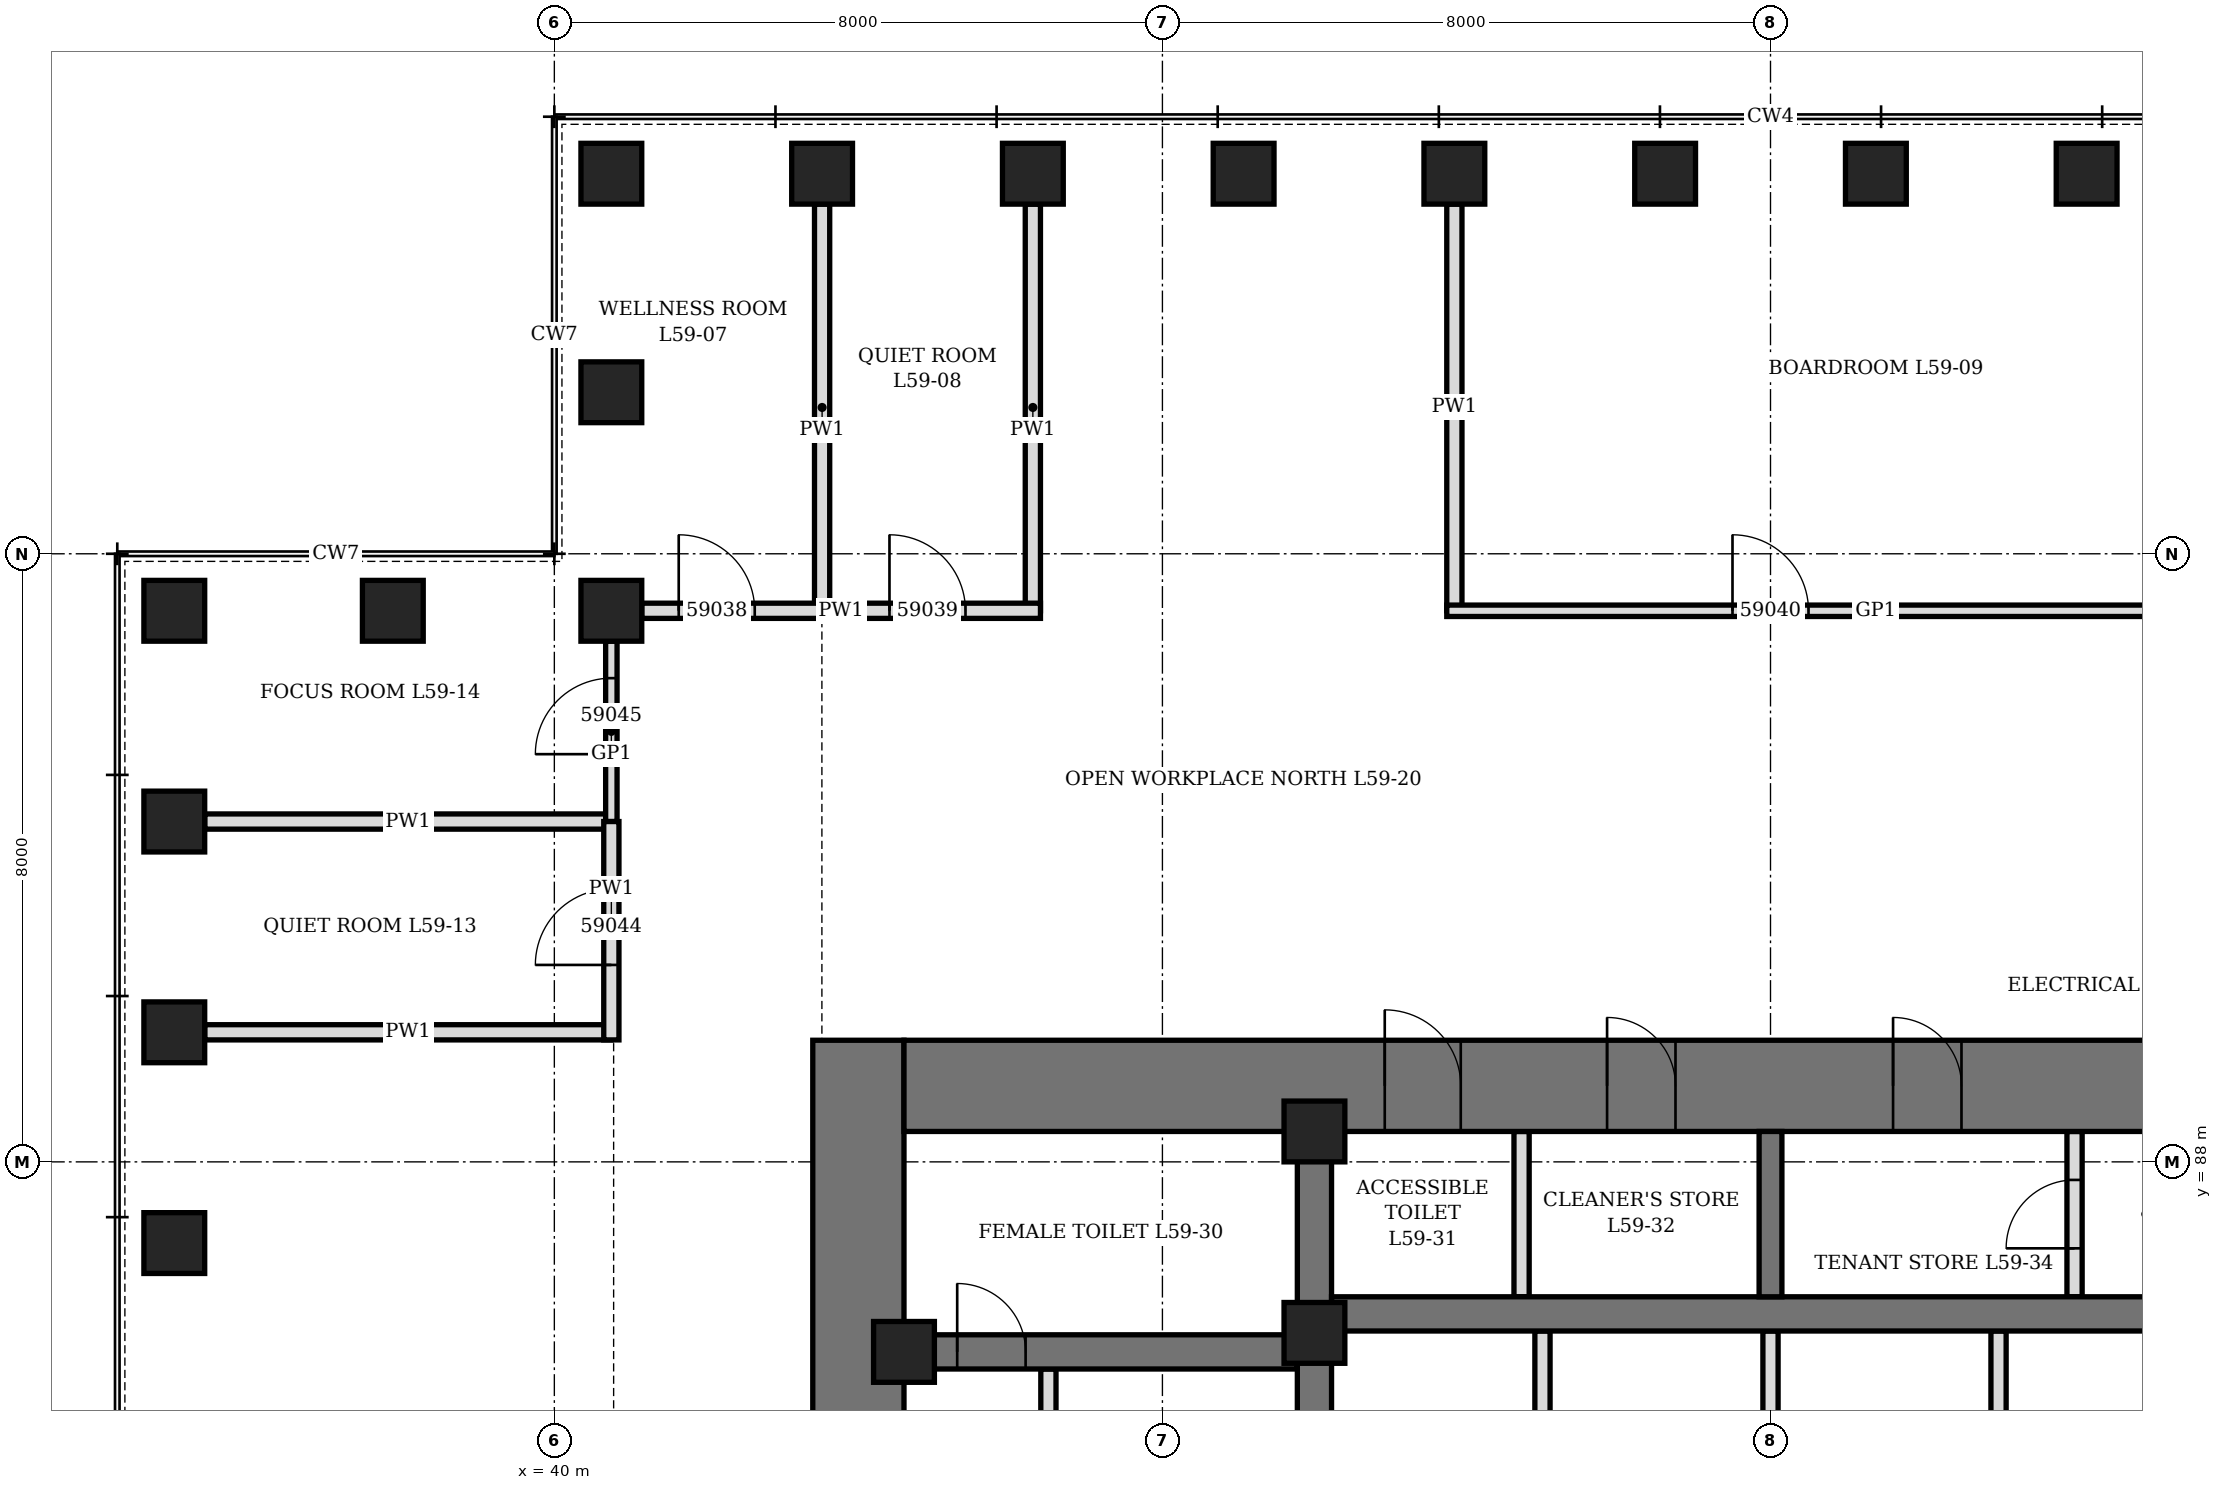
"""IFC4 building model, lengths in metres.
Left out: names, types, materials, properties, quantities, classifications, styles, units other than length and angle.
Written with IfcOpenShell. Run it as: python <this file> out.ifc"""

import sys

from ifc_helpers import new_model, si_unit, direction, frame, frame_2d, origin, origin_2d, place, context, subcontext, project, spatial, rectangle, hollow_rectangle, extrude, element, fill, save


model = new_model("IFC4")
c1 = context("Model", 3, precision=1e-05, world=origin(), true_north=direction((0.0, 1.0)))
c2 = subcontext(c1, "Body", "Model", "MODEL_VIEW")
j1 = project(units=[si_unit("LENGTHUNIT", "METRE"), si_unit("PLANEANGLEUNIT", "RADIAN")], contexts=[c1])
p1 = place(None, origin())
s1 = spatial("IfcSite", under=j1, at=p1, CompositionType="ELEMENT")
p2 = place(p1, origin())
s2 = spatial("IfcBuilding", under=s1, at=p2, CompositionType="ELEMENT")
p3 = place(p2, frame((0.0, 0.0, 262.9)))
s3 = spatial("IfcBuildingStorey", under=s2, at=p3, CompositionType="ELEMENT", Elevation=262.9)
for number, where, z_axis, x_axis in (
    (1, (60.159, 101.0, 0.0), (0.0, 0.0, 1.0), (1.0, 0.0, 0.0)),
    (2, (57.386, 101.0, 0.0), (0.0, 0.0, 1.0), (1.0, 0.0, 0.0)),
    (3, (54.614, 101.0, 0.0), (0.0, 0.0, 1.0), (1.0, 0.0, 0.0)),
    (4, (51.841, 101.0, 0.0), (0.0, 0.0, 1.0), (1.0, 0.0, 0.0)),
    (5, (49.068, 101.0, 0.0), (0.0, 0.0, 1.0), (1.0, 0.0, 0.0)),
    (6, (46.295, 101.0, 0.0), (0.0, 0.0, 1.0), (1.0, 0.0, 0.0)),
    (7, (43.523, 101.0, 0.0), (0.0, 0.0, 1.0), (1.0, 0.0, 0.0)),
    (8, (40.75, 101.0, 0.0), (0.0, 0.0, 1.0), (0.0, 1.0, 0.0)),
    (9, (40.75, 98.125, 0.0), (0.0, 0.0, 1.0), (0.0, 1.0, 0.0)),
    (10, (40.75, 95.25, 0.0), (0.0, 0.0, 1.0), (1.0, 0.0, 0.0)),
    (11, (37.875, 95.25, 0.0), (0.0, 0.0, 1.0), (1.0, 0.0, 0.0)),
    (12, (35.0, 95.25, 0.0), (0.0, 0.0, 1.0), (0.0, 1.0, 0.0)),
    (13, (35.0, 92.477, 0.0), (0.0, 0.0, 1.0), (0.0, 1.0, 0.0)),
    (14, (35.0, 89.705, 0.0), (0.0, 0.0, 1.0), (0.0, 1.0, 0.0)),
    (15, (35.0, 86.932, 0.0), (0.0, 0.0, 1.0), (0.0, 1.0, 0.0)),
):
    element("IfcColumn", number, at=place(p3, frame(where, z_axis=z_axis, x_axis=x_axis)), inside=s3, PredefinedType="COLUMN", context=c2, shape_type="SweptSolid", body=[
        extrude(hollow_rectangle(XDim=0.8, YDim=0.8, WallThickness=0.1, at=origin_2d()), origin(), (0.0, 0.0, 1.0), 4.2),
    ])
p4 = place(p3, frame((44.0, 70.4, 0.0), z_axis=(0.0, 0.0, 1.0), x_axis=(0.0, 1.0, 0.0)))
e16 = element("IfcWall", 16, at=p4, inside=s3, PredefinedType="SHEAR", context=c2, shape_type="SweptSolid", body=[
    extrude(rectangle(XDim=19.2, YDim=1.2, at=frame_2d((9.6, 0.0))), origin(), (0.0, 0.0, 1.0), 4.2),
])
p5 = place(p4, frame((8.6, 0.0, 0.0)))
e17 = element("IfcOpeningElement", 17, at=p5, cuts=e16, PredefinedType="OPENING", context=c2, shape_type="SweptSolid", body=[
    extrude(rectangle(XDim=2.0, YDim=2.4, at=frame_2d((1.0, 1.2))), frame((0.0, 0.61, 0.0), z_axis=(0.0, -1.0, 0.0), x_axis=(1.0, 0.0, 0.0)), (0.0, 0.0, 1.0), 1.22),
])
p6 = place(p3, frame((44.6, 89.0, 0.0), z_axis=(0.0, 0.0, 1.0), x_axis=(1.0, 0.0, 0.0)))
e18 = element("IfcWall", 18, at=p6, inside=s3, PredefinedType="SHEAR", context=c2, shape_type="SweptSolid", body=[
    extrude(rectangle(XDim=22.8, YDim=1.2, at=frame_2d((11.4, 0.0))), origin(), (0.0, 0.0, 1.0), 4.2),
])
p7 = place(p6, frame((6.325, 0.0, 0.0)))
e19 = element("IfcOpeningElement", 19, at=p7, cuts=e18, PredefinedType="OPENING", context=c2, shape_type="SweptSolid", body=[
    extrude(rectangle(XDim=1.0, YDim=2.1, at=frame_2d((0.5, 1.05))), frame((0.0, 0.61, 0.0), z_axis=(0.0, -1.0, 0.0), x_axis=(1.0, 0.0, 0.0)), (0.0, 0.0, 1.0), 1.22),
])
p8 = place(p6, frame((9.25, 0.0, 0.0)))
e20 = element("IfcOpeningElement", 20, at=p8, cuts=e18, PredefinedType="OPENING", context=c2, shape_type="SweptSolid", body=[
    extrude(rectangle(XDim=0.9, YDim=2.1, at=frame_2d((0.45, 1.05))), frame((0.0, 0.61, 0.0), z_axis=(0.0, -1.0, 0.0), x_axis=(1.0, 0.0, 0.0)), (0.0, 0.0, 1.0), 1.22),
])
p9 = place(p6, frame((13.012, 0.0, 0.0)))
e21 = element("IfcOpeningElement", 21, at=p9, cuts=e18, PredefinedType="OPENING", context=c2, shape_type="SweptSolid", body=[
    extrude(rectangle(XDim=0.9, YDim=2.1, at=frame_2d((0.45, 1.05))), frame((0.0, 0.61, 0.0), z_axis=(0.0, -1.0, 0.0), x_axis=(1.0, 0.0, 0.0)), (0.0, 0.0, 1.0), 1.22),
])
p10 = place(p3, frame((50.0, 71.6, 0.0), z_axis=(0.0, 0.0, 1.0), x_axis=(0.0, 1.0, 0.0)))
e22 = element("IfcWall", 22, at=p10, inside=s3, PredefinedType="SHEAR", context=c2, shape_type="SweptSolid", body=[
    extrude(rectangle(XDim=16.8, YDim=0.45, at=frame_2d((8.4, 0.0))), origin(), (0.0, 0.0, 1.0), 4.2),
])
p11 = place(p10, frame((7.5, 0.0, 0.0)))
e23 = element("IfcOpeningElement", 23, at=p11, cuts=e22, PredefinedType="OPENING", context=c2, shape_type="SweptSolid", body=[
    extrude(rectangle(XDim=1.8, YDim=2.4, at=frame_2d((0.9, 1.2))), frame((0.0, 0.235, 0.0), z_axis=(0.0, -1.0, 0.0), x_axis=(1.0, 0.0, 0.0)), (0.0, 0.0, 1.0), 0.47),
])
p12 = place(p3, frame((44.6, 85.5, 0.0), z_axis=(0.0, 0.0, 1.0), x_axis=(1.0, 0.0, 0.0)))
e24 = element("IfcWall", 24, at=p12, inside=s3, PredefinedType="SHEAR", context=c2, shape_type="SweptSolid", body=[
    extrude(rectangle(XDim=5.175, YDim=0.45, at=frame_2d((2.587, 0.0))), origin(), (0.0, 0.0, 1.0), 4.2),
])
p13 = place(p12, frame((0.7, 0.0, 0.0)))
e25 = element("IfcOpeningElement", 25, at=p13, cuts=e24, PredefinedType="OPENING", context=c2, shape_type="SweptSolid", body=[
    extrude(rectangle(XDim=0.9, YDim=2.1, at=frame_2d((0.45, 1.05))), frame((0.0, 0.235, 0.0), z_axis=(0.0, -1.0, 0.0), x_axis=(1.0, 0.0, 0.0)), (0.0, 0.0, 1.0), 0.47),
])
p14 = place(p3, frame((50.225, 86.0, 0.0), z_axis=(0.0, 0.0, 1.0), x_axis=(1.0, 0.0, 0.0)))
e26 = element("IfcWall", 26, at=p14, inside=s3, PredefinedType="SHEAR", context=c2, shape_type="SweptSolid", body=[
    extrude(rectangle(XDim=11.55, YDim=0.45, at=frame_2d((5.775, 0.0))), origin(), (0.0, 0.0, 1.0), 4.2),
])
p15 = place(p3, frame((56.0, 86.225, 0.0), z_axis=(0.0, 0.0, 1.0), x_axis=(0.0, 1.0, 0.0)))
e27 = element("IfcWall", 27, at=p15, inside=s3, PredefinedType="SHEAR", context=c2, shape_type="SweptSolid", body=[
    extrude(rectangle(XDim=2.175, YDim=0.3, at=frame_2d((1.087, 0.0))), origin(), (0.0, 0.0, 1.0), 4.2),
])
for number, where, z_axis, x_axis in (
    (28, (44.6, 85.5, 0.0), (0.0, 0.0, 1.0), (1.0, 0.0, 0.0)),
    (29, (50.0, 85.75, 0.0), (0.0, 0.0, 1.0), (1.0, 0.0, 0.0)),
    (30, (50.0, 88.4, 0.0), (0.0, 0.0, 1.0), (1.0, 0.0, 0.0)),
):
    element("IfcColumn", number, at=place(p3, frame(where, z_axis=z_axis, x_axis=x_axis)), inside=s3, PredefinedType="COLUMN", context=c2, shape_type="SweptSolid", body=[
        extrude(hollow_rectangle(XDim=0.8, YDim=0.8, WallThickness=0.1, at=origin_2d()), origin(), (0.0, 0.0, 1.0), 4.2),
    ])
p16 = place(p3, frame((46.5, 82.225, 0.0), z_axis=(0.0, 0.0, 1.0), x_axis=(0.0, 1.0, 0.0)))
e31 = element("IfcWall", 31, at=p16, inside=s3, PredefinedType="PARTITIONING", context=c2, shape_type="SweptSolid", body=[
    extrude(rectangle(XDim=3.05, YDim=0.2, at=frame_2d((1.525, 0.0))), origin(), (0.0, 0.0, 1.0), 4.04),
])
p17 = place(p16, frame((1.075, 0.0, 0.0)))
e32 = element("IfcOpeningElement", 32, at=p17, cuts=e31, PredefinedType="OPENING", context=c2, shape_type="SweptSolid", body=[
    extrude(rectangle(XDim=0.9, YDim=2.1, at=frame_2d((0.45, 1.05))), frame((0.0, 0.11, 0.0), z_axis=(0.0, -1.0, 0.0), x_axis=(1.0, 0.0, 0.0)), (0.0, 0.0, 1.0), 0.22),
])
p18 = place(p3, frame((52.725, 86.225, 0.0), z_axis=(0.0, 0.0, 1.0), x_axis=(0.0, 1.0, 0.0)))
e33 = element("IfcWall", 33, at=p18, inside=s3, PredefinedType="PARTITIONING", context=c2, shape_type="SweptSolid", body=[
    extrude(rectangle(XDim=2.175, YDim=0.2, at=frame_2d((1.087, 0.0))), origin(), (0.0, 0.0, 1.0), 4.04),
])
p19 = place(p3, frame((60.0, 86.225, 0.0), z_axis=(0.0, 0.0, 1.0), x_axis=(0.0, 1.0, 0.0)))
e34 = element("IfcWall", 34, at=p19, inside=s3, PredefinedType="PARTITIONING", context=c2, shape_type="SweptSolid", body=[
    extrude(rectangle(XDim=2.175, YDim=0.2, at=frame_2d((1.087, 0.0))), origin(), (0.0, 0.0, 1.0), 4.04),
])
p20 = place(p19, frame((0.637, 0.0, 0.0)))
e35 = element("IfcOpeningElement", 35, at=p20, cuts=e34, PredefinedType="OPENING", context=c2, shape_type="SweptSolid", body=[
    extrude(rectangle(XDim=0.9, YDim=2.1, at=frame_2d((0.45, 1.05))), frame((0.0, 0.11, 0.0), z_axis=(0.0, -1.0, 0.0), x_axis=(1.0, 0.0, 0.0)), (0.0, 0.0, 1.0), 0.22),
])
p21 = place(p3, frame((53.0, 82.225, 0.0), z_axis=(0.0, 0.0, 1.0), x_axis=(0.0, 1.0, 0.0)))
e36 = element("IfcWall", 36, at=p21, inside=s3, PredefinedType="PARTITIONING", context=c2, shape_type="SweptSolid", body=[
    extrude(rectangle(XDim=3.55, YDim=0.2, at=frame_2d((1.775, 0.0))), origin(), (0.0, 0.0, 1.0), 4.04),
])
p22 = place(p3, frame((56.0, 82.225, 0.0), z_axis=(0.0, 0.0, 1.0), x_axis=(0.0, 1.0, 0.0)))
e37 = element("IfcWall", 37, at=p22, inside=s3, PredefinedType="PARTITIONING", context=c2, shape_type="SweptSolid", body=[
    extrude(rectangle(XDim=3.55, YDim=0.2, at=frame_2d((1.775, 0.0))), origin(), (0.0, 0.0, 1.0), 3.14),
])
p23 = place(p3, frame((59.0, 82.225, 0.0), z_axis=(0.0, 0.0, 1.0), x_axis=(0.0, 1.0, 0.0)))
e38 = element("IfcWall", 38, at=p23, inside=s3, PredefinedType="PARTITIONING", context=c2, shape_type="SweptSolid", body=[
    extrude(rectangle(XDim=3.55, YDim=0.2, at=frame_2d((1.775, 0.0))), origin(), (0.0, 0.0, 1.0), 4.04),
])
for number, where, z_axis, x_axis in (
    (39, (43.523, 95.25, 0.0), (0.0, 0.0, 1.0), (0.0, 1.0, 0.0)),
    (40, (46.295, 95.25, 0.0), (0.0, 0.0, 1.0), (0.0, 1.0, 0.0)),
    (41, (51.841, 95.25, 0.0), (0.0, 0.0, 1.0), (0.0, 1.0, 0.0)),
    (42, (35.4, 89.705, 0.0), (0.0, 0.0, 1.0), (1.0, 0.0, 0.0)),
    (43, (35.4, 92.477, 0.0), (0.0, 0.0, 1.0), (1.0, 0.0, 0.0)),
):
    element("IfcWall", number, at=place(p3, frame(where, z_axis=z_axis, x_axis=x_axis)), inside=s3, PredefinedType="PARTITIONING", context=c2, shape_type="SweptSolid", body=[
        extrude(rectangle(XDim=5.35, YDim=0.2, at=frame_2d((2.675, 0.0))), origin(), (0.0, 0.0, 1.0), 3.428),
    ])
p24 = place(p3, frame((51.741, 95.25, 0.0), z_axis=(0.0, 0.0, 1.0), x_axis=(1.0, 0.0, 0.0)))
e44 = element("IfcWall", 44, at=p24, inside=s3, PredefinedType="PARTITIONING", context=c2, shape_type="SweptSolid", body=[
    extrude(rectangle(XDim=11.291, YDim=0.15, at=frame_2d((5.646, 0.0))), origin(), (0.0, 0.0, 1.0), 4.04),
])
p25 = place(p24, frame((3.759, 0.0, 0.0)))
e45 = element("IfcOpeningElement", 45, at=p25, cuts=e44, PredefinedType="OPENING", context=c2, shape_type="SweptSolid", body=[
    extrude(rectangle(XDim=1.0, YDim=2.4, at=frame_2d((0.5, 1.2))), frame((0.0, 0.085, 0.0), z_axis=(0.0, -1.0, 0.0), x_axis=(1.0, 0.0, 0.0)), (0.0, 0.0, 1.0), 0.17),
])
p26 = place(p3, frame((41.15, 95.25, 0.0), z_axis=(0.0, 0.0, 1.0), x_axis=(1.0, 0.0, 0.0)))
e46 = element("IfcWall", 46, at=p26, inside=s3, PredefinedType="PARTITIONING", context=c2, shape_type="SweptSolid", body=[
    extrude(rectangle(XDim=5.246, YDim=0.2, at=frame_2d((2.623, 0.0))), origin(), (0.0, 0.0, 1.0), 4.04),
])
p27 = place(p26, frame((0.486, 0.0, 0.0)))
e47 = element("IfcOpeningElement", 47, at=p27, cuts=e46, PredefinedType="OPENING", context=c2, shape_type="SweptSolid", body=[
    extrude(rectangle(XDim=1.0, YDim=2.1, at=frame_2d((0.5, 1.05))), frame((0.0, 0.11, 0.0), z_axis=(0.0, -1.0, 0.0), x_axis=(1.0, 0.0, 0.0)), (0.0, 0.0, 1.0), 0.22),
])
p28 = place(p26, frame((3.259, 0.0, 0.0)))
e48 = element("IfcOpeningElement", 48, at=p28, cuts=e46, PredefinedType="OPENING", context=c2, shape_type="SweptSolid", body=[
    extrude(rectangle(XDim=1.0, YDim=2.1, at=frame_2d((0.5, 1.05))), frame((0.0, 0.11, 0.0), z_axis=(0.0, -1.0, 0.0), x_axis=(1.0, 0.0, 0.0)), (0.0, 0.0, 1.0), 0.22),
])
p29 = place(p3, frame((40.75, 92.477, 0.0), z_axis=(0.0, 0.0, 1.0), x_axis=(0.0, 1.0, 0.0)))
e49 = element("IfcWall", 49, at=p29, inside=s3, PredefinedType="PARTITIONING", context=c2, shape_type="SweptSolid", body=[
    extrude(rectangle(XDim=2.373, YDim=0.15, at=frame_2d((1.187, 0.0))), origin(), (0.0, 0.0, 1.0), 4.04),
])
p30 = place(p29, frame((0.886, 0.0, 0.0)))
e50 = element("IfcOpeningElement", 50, at=p30, cuts=e49, PredefinedType="OPENING", context=c2, shape_type="SweptSolid", body=[
    extrude(rectangle(XDim=1.0, YDim=2.4, at=frame_2d((0.5, 1.2))), frame((0.0, 0.085, 0.0), z_axis=(0.0, -1.0, 0.0), x_axis=(1.0, 0.0, 0.0)), (0.0, 0.0, 1.0), 0.17),
])
p31 = place(p3, frame((40.75, 89.604, 0.0), z_axis=(0.0, 0.0, 1.0), x_axis=(0.0, 1.0, 0.0)))
e51 = element("IfcWall", 51, at=p31, inside=s3, PredefinedType="PARTITIONING", context=c2, shape_type="SweptSolid", body=[
    extrude(rectangle(XDim=2.873, YDim=0.2, at=frame_2d((1.437, 0.0))), origin(), (0.0, 0.0, 1.0), 4.04),
])
p32 = place(p31, frame((0.986, 0.0, 0.0)))
e52 = element("IfcOpeningElement", 52, at=p32, cuts=e51, PredefinedType="OPENING", context=c2, shape_type="SweptSolid", body=[
    extrude(rectangle(XDim=1.0, YDim=2.1, at=frame_2d((0.5, 1.05))), frame((0.0, 0.11, 0.0), z_axis=(0.0, -1.0, 0.0), x_axis=(1.0, 0.0, 0.0)), (0.0, 0.0, 1.0), 0.22),
])
p33 = place(p13, origin())
e53 = element("IfcDoor", 53, at=p33, inside=s3, OperationType="SINGLE_SWING_RIGHT", PredefinedType="DOOR", context=c2, shape_type="SweptSolid", body=[
    extrude(rectangle(XDim=0.9, YDim=2.1, at=frame_2d((0.45, 1.05))), frame((0.0, 0.225, 0.0), z_axis=(0.0, -1.0, 0.0), x_axis=(1.0, 0.0, 0.0)), (0.0, 0.0, 1.0), 0.449),
])
fill(e25, e53)
p34 = place(p7, origin())
e54 = element("IfcDoor", 54, at=p34, inside=s3, OperationType="SINGLE_SWING_LEFT", PredefinedType="DOOR", context=c2, shape_type="SweptSolid", body=[
    extrude(rectangle(XDim=1.0, YDim=2.1, at=frame_2d((0.5, 1.05))), frame((0.0, 0.35, 0.0), z_axis=(0.0, -1.0, 0.0), x_axis=(1.0, 0.0, 0.0)), (0.0, 0.0, 1.0), 0.7),
])
fill(e19, e54)
p35 = place(p8, origin())
e55 = element("IfcDoor", 55, at=p35, inside=s3, OperationType="SINGLE_SWING_LEFT", PredefinedType="DOOR", context=c2, shape_type="SweptSolid", body=[
    extrude(rectangle(XDim=0.9, YDim=2.1, at=frame_2d((0.45, 1.05))), frame((0.0, 0.35, 0.0), z_axis=(0.0, -1.0, 0.0), x_axis=(1.0, 0.0, 0.0)), (0.0, 0.0, 1.0), 0.7),
])
fill(e20, e55)
p36 = place(p9, origin())
e56 = element("IfcDoor", 56, at=p36, inside=s3, OperationType="SINGLE_SWING_LEFT", PredefinedType="DOOR", context=c2, shape_type="SweptSolid", body=[
    extrude(rectangle(XDim=0.9, YDim=2.1, at=frame_2d((0.45, 1.05))), frame((0.0, 0.35, 0.0), z_axis=(0.0, -1.0, 0.0), x_axis=(1.0, 0.0, 0.0)), (0.0, 0.0, 1.0), 0.7),
])
fill(e21, e56)
p37 = place(p20, origin())
e57 = element("IfcDoor", 57, at=p37, inside=s3, OperationType="SINGLE_SWING_LEFT", PredefinedType="DOOR", context=c2, shape_type="SweptSolid", body=[
    extrude(rectangle(XDim=0.9, YDim=2.1, at=frame_2d((0.45, 1.05))), frame((0.0, 0.1, 0.0), z_axis=(0.0, -1.0, 0.0), x_axis=(1.0, 0.0, 0.0)), (0.0, 0.0, 1.0), 0.199),
])
fill(e35, e57)
p38 = place(p27, origin())
e58 = element("IfcDoor", 58, at=p38, inside=s3, OperationType="SINGLE_SWING_LEFT", PredefinedType="DOOR", context=c2, shape_type="SweptSolid", body=[
    extrude(rectangle(XDim=1.0, YDim=2.1, at=frame_2d((0.5, 1.05))), frame((0.0, 0.1, 0.0), z_axis=(0.0, -1.0, 0.0), x_axis=(1.0, 0.0, 0.0)), (0.0, 0.0, 1.0), 0.199),
])
fill(e47, e58)
p39 = place(p28, origin())
e59 = element("IfcDoor", 59, at=p39, inside=s3, OperationType="SINGLE_SWING_LEFT", PredefinedType="DOOR", context=c2, shape_type="SweptSolid", body=[
    extrude(rectangle(XDim=1.0, YDim=2.1, at=frame_2d((0.5, 1.05))), frame((0.0, 0.1, 0.0), z_axis=(0.0, -1.0, 0.0), x_axis=(1.0, 0.0, 0.0)), (0.0, 0.0, 1.0), 0.199),
])
fill(e48, e59)
p40 = place(p25, origin())
e60 = element("IfcDoor", 60, at=p40, inside=s3, OperationType="SINGLE_SWING_RIGHT", PredefinedType="DOOR", context=c2, shape_type="SweptSolid", body=[
    extrude(rectangle(XDim=1.0, YDim=2.4, at=frame_2d((0.5, 1.2))), frame((0.0, 0.075, 0.0), z_axis=(0.0, -1.0, 0.0), x_axis=(1.0, 0.0, 0.0)), (0.0, 0.0, 1.0), 0.149),
])
fill(e45, e60)
p41 = place(p32, origin())
e61 = element("IfcDoor", 61, at=p41, inside=s3, OperationType="SINGLE_SWING_LEFT", PredefinedType="DOOR", context=c2, shape_type="SweptSolid", body=[
    extrude(rectangle(XDim=1.0, YDim=2.1, at=frame_2d((0.5, 1.05))), frame((0.0, 0.1, 0.0), z_axis=(0.0, -1.0, 0.0), x_axis=(1.0, 0.0, 0.0)), (0.0, 0.0, 1.0), 0.199),
])
fill(e52, e61)
p42 = place(p30, origin())
e62 = element("IfcDoor", 62, at=p42, inside=s3, OperationType="SINGLE_SWING_RIGHT", PredefinedType="DOOR", context=c2, shape_type="SweptSolid", body=[
    extrude(rectangle(XDim=1.0, YDim=2.4, at=frame_2d((0.5, 1.2))), frame((0.0, 0.075, 0.0), z_axis=(0.0, -1.0, 0.0), x_axis=(1.0, 0.0, 0.0)), (0.0, 0.0, 1.0), 0.149),
])
fill(e50, e62)
save(model, sys.argv[1])
